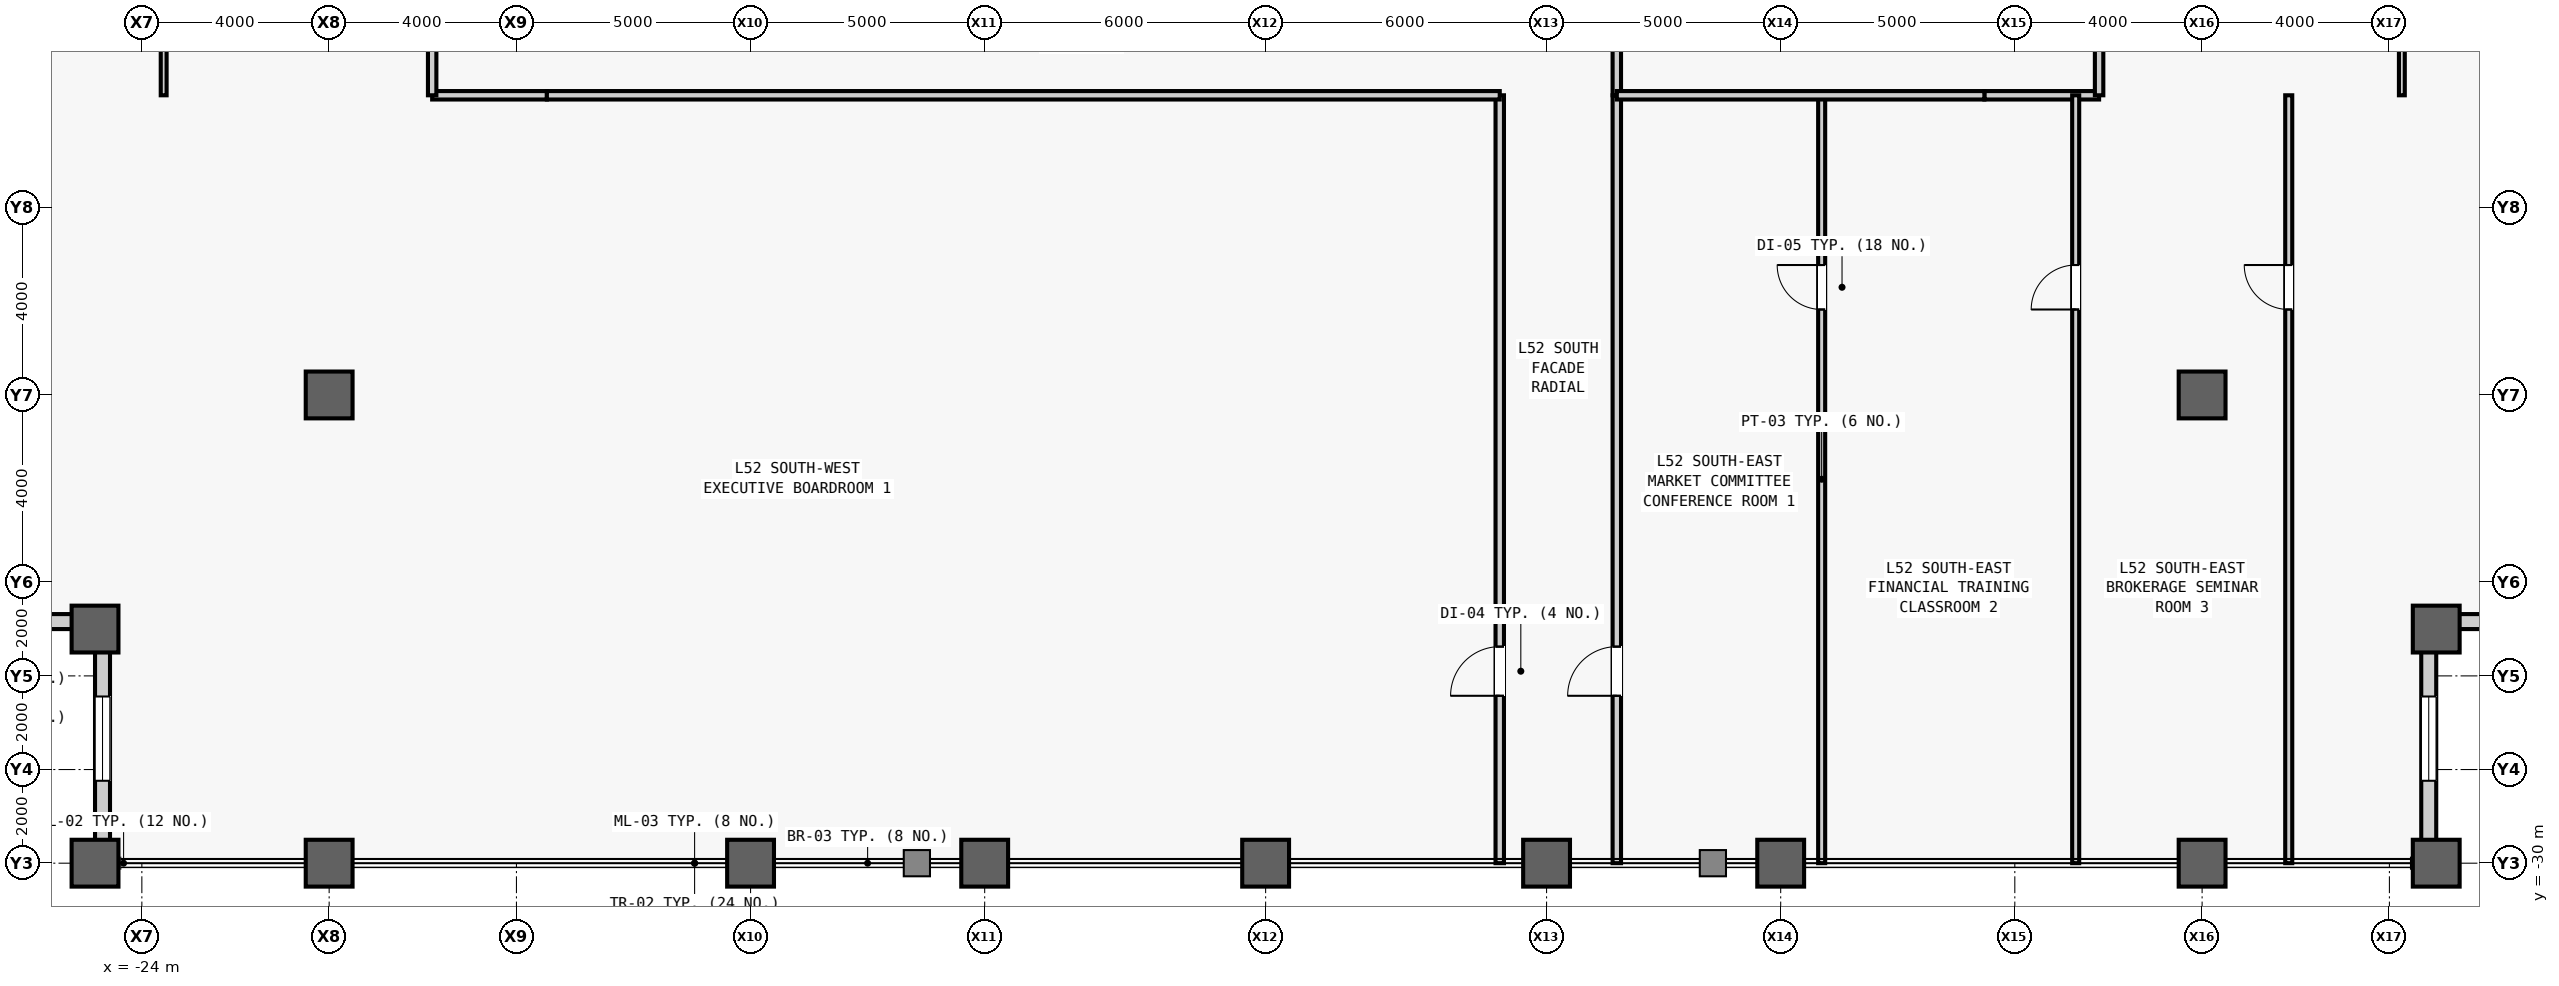
"""IFC4 building model, lengths in metres.
Left out: names, types, materials, properties, quantities, classifications, styles, units other than length and angle.
Written with IfcOpenShell. Run it as: python <this file> out.ifc"""

import sys

from ifc_helpers import new_model, si_unit, direction, frame, frame_2d, origin, origin_2d, place, context, subcontext, project, spatial, rectangle, hollow_rectangle, extrude, source, transform, mapped, element, fill, save


model = new_model("IFC4")
c1 = context("Model", 3, precision=1e-05, world=origin(), true_north=direction((0.0, 1.0)))
c2 = subcontext(c1, "Body", "Model", "MODEL_VIEW")
j1 = project(units=[si_unit("LENGTHUNIT", "METRE"), si_unit("PLANEANGLEUNIT", "RADIAN")], contexts=[c1])
p1 = place(None, origin())
s1 = spatial("IfcSite", under=j1, at=p1, CompositionType="ELEMENT")
p2 = place(p1, origin())
s2 = spatial("IfcBuilding", under=s1, at=p2, CompositionType="ELEMENT")
p3 = place(p2, frame((0.0, 0.0, 223.1)))
s3 = spatial("IfcBuildingStorey", under=s2, at=p3, CompositionType="ELEMENT", Elevation=223.1)
m1 = source(origin(), c2, "Body", "SweptSolid", [
    extrude(hollow_rectangle(XDim=1.0, YDim=1.0, WallThickness=0.055, at=origin_2d()), origin(), (0.0, 0.0, 1.0), 4.0),
])
for number, where, z_axis, x_axis in (
    (1, (-25.0, -30.0, 0.0), (0.0, 0.0, 1.0), (1.0, 0.0, 0.0)),
    (2, (-25.0, -25.0, 0.0), (0.0, 0.0, 1.0), (1.0, 0.0, 0.0)),
    (3, (-20.0, -30.0, 0.0), (0.0, 0.0, 1.0), (1.0, 0.0, 0.0)),
    (4, (-20.0, -20.0, 0.0), (0.0, 0.0, 1.0), (1.0, 0.0, 0.0)),
    (5, (-11.0, -30.0, 0.0), (0.0, 0.0, 1.0), (1.0, 0.0, 0.0)),
    (6, (-6.0, -30.0, 0.0), (0.0, 0.0, 1.0), (1.0, 0.0, 0.0)),
    (7, (0.0, -30.0, 0.0), (0.0, 0.0, 1.0), (1.0, 0.0, 0.0)),
    (8, (6.0, -30.0, 0.0), (0.0, 0.0, 1.0), (1.0, 0.0, 0.0)),
    (9, (11.0, -30.0, 0.0), (0.0, 0.0, 1.0), (1.0, 0.0, 0.0)),
    (10, (20.0, -30.0, 0.0), (0.0, 0.0, 1.0), (1.0, 0.0, 0.0)),
    (11, (20.0, -20.0, 0.0), (0.0, 0.0, 1.0), (1.0, 0.0, 0.0)),
    (12, (25.0, -30.0, 0.0), (0.0, 0.0, 1.0), (1.0, 0.0, 0.0)),
    (13, (25.0, -25.0, 0.0), (0.0, 0.0, 1.0), (1.0, 0.0, 0.0)),
):
    element("IfcColumn", number, at=place(p3, frame(where, z_axis=z_axis, x_axis=x_axis)), inside=s3, PredefinedType="COLUMN", context=c2, shape_type="MappedRepresentation", body=[
        mapped(m1, transform((0.0, 0.0, 0.0), scale=1.0)),
    ])
m2 = source(origin(), c2, "Body", "SweptSolid", [
    extrude(rectangle(XDim=4.68, YDim=0.32, at=frame_2d((2.34, 0.0))), origin(), (0.0, 0.0, 1.0), 3.164),
])
p4 = place(p3, frame((-25.0, -24.84, 0.0), z_axis=(0.0, 0.0, 1.0), x_axis=(-1.0, 0.0, 0.0)))
e14 = element("IfcWall", 14, at=p4, inside=s3, PredefinedType="STANDARD", context=c2, shape_type="MappedRepresentation", body=[
    mapped(m2, transform((0.0, 0.0, 0.0), scale=1.0)),
])
m3 = source(origin(), c2, "Body", "SweptSolid", [
    extrude(rectangle(XDim=1.8, YDim=2.4, at=frame_2d((0.9, 1.2))), frame((0.0, 0.17, 0.0), z_axis=(0.0, -1.0, 0.0), x_axis=(1.0, 0.0, 0.0)), (0.0, 0.0, 1.0), 0.34),
])
p5 = place(p4, frame((1.44, 0.0, 0.5)))
e15 = element("IfcOpeningElement", 15, at=p5, cuts=e14, PredefinedType="OPENING", context=c2, shape_type="MappedRepresentation", body=[
    mapped(m3, transform((0.0, 0.0, 0.0), scale=1.0)),
])
p6 = place(p3, frame((-24.84, -29.68, 0.0), z_axis=(0.0, 0.0, 1.0), x_axis=(0.0, 1.0, 0.0)))
e16 = element("IfcWall", 16, at=p6, inside=s3, PredefinedType="STANDARD", context=c2, shape_type="MappedRepresentation", body=[
    mapped(m2, transform((0.0, 0.0, 0.0), scale=1.0)),
])
p7 = place(p6, frame((1.44, 0.0, 0.5)))
e17 = element("IfcOpeningElement", 17, at=p7, cuts=e16, PredefinedType="OPENING", context=c2, shape_type="MappedRepresentation", body=[
    mapped(m3, transform((0.0, 0.0, 0.0), scale=1.0)),
])
p8 = place(p3, frame((24.84, -29.68, 0.0), z_axis=(0.0, 0.0, 1.0), x_axis=(0.0, 1.0, 0.0)))
e18 = element("IfcWall", 18, at=p8, inside=s3, PredefinedType="STANDARD", context=c2, shape_type="MappedRepresentation", body=[
    mapped(m2, transform((0.0, 0.0, 0.0), scale=1.0)),
])
p9 = place(p8, frame((1.44, 0.0, 0.5)))
e19 = element("IfcOpeningElement", 19, at=p9, cuts=e18, PredefinedType="OPENING", context=c2, shape_type="MappedRepresentation", body=[
    mapped(m3, transform((0.0, 0.0, 0.0), scale=1.0)),
])
p10 = place(p3, frame((25.0, -24.84, 0.0), z_axis=(0.0, 0.0, 1.0), x_axis=(1.0, 0.0, 0.0)))
e20 = element("IfcWall", 20, at=p10, inside=s3, PredefinedType="STANDARD", context=c2, shape_type="MappedRepresentation", body=[
    mapped(m2, transform((0.0, 0.0, 0.0), scale=1.0)),
])
p11 = place(p10, frame((1.44, 0.0, 0.5)))
e21 = element("IfcOpeningElement", 21, at=p11, cuts=e20, PredefinedType="OPENING", context=c2, shape_type="MappedRepresentation", body=[
    mapped(m3, transform((0.0, 0.0, 0.0), scale=1.0)),
])
m4 = source(origin(), c2, "Body", "SweptSolid", [
    extrude(rectangle(XDim=2.45, YDim=0.18, at=frame_2d((1.225, 0.0))), origin(), (0.0, 0.0, 1.0), 3.78),
])
for number, where, z_axis, x_axis in (
    (22, (15.35, -13.6, 0.0), (0.0, 0.0, 1.0), (1.0, 0.0, 0.0)),
    (23, (-17.8, -13.6, 0.0), (0.0, 0.0, 1.0), (1.0, 0.0, 0.0)),
):
    element("IfcWall", number, at=place(p3, frame(where, z_axis=z_axis, x_axis=x_axis)), inside=s3, PredefinedType="PARTITIONING", context=c2, shape_type="MappedRepresentation", body=[
        mapped(m4, transform((0.0, 0.0, 0.0), scale=1.0)),
    ])
m5 = source(origin(), c2, "Body", "SweptSolid", [
    extrude(rectangle(XDim=2.6, YDim=0.18, at=frame_2d((1.3, 0.0))), origin(), (0.0, 0.0, 1.0), 3.78),
])
p12 = place(p3, frame((7.5, -13.6, 0.0), z_axis=(0.0, 0.0, 1.0), x_axis=(0.0, 1.0, 0.0)))
e24 = element("IfcWall", 24, at=p12, inside=s3, PredefinedType="PARTITIONING", context=c2, shape_type="MappedRepresentation", body=[
    mapped(m5, transform((0.0, 0.0, 0.0), scale=1.0)),
])
m6 = source(origin(), c2, "Body", "SweptSolid", [
    extrude(rectangle(XDim=16.4, YDim=0.18, at=frame_2d((8.2, 0.0))), origin(), (0.0, 0.0, 1.0), 3.78),
])
p13 = place(p3, frame((5.0, -30.0, 0.0), z_axis=(0.0, 0.0, 1.0), x_axis=(0.0, 1.0, 0.0)))
e25 = element("IfcWall", 25, at=p13, inside=s3, PredefinedType="PARTITIONING", context=c2, shape_type="MappedRepresentation", body=[
    mapped(m6, transform((0.0, 0.0, 0.0), scale=1.0)),
])
m7 = source(origin(), c2, "Body", "SweptSolid", [
    extrude(rectangle(XDim=1.05, YDim=2.2, at=frame_2d((0.525, 1.1))), frame((0.0, 0.1, 0.0), z_axis=(0.0, -1.0, 0.0), x_axis=(1.0, 0.0, 0.0)), (0.0, 0.0, 1.0), 0.2),
])
p14 = place(p13, frame((3.575, 0.0, 0.0)))
e26 = element("IfcOpeningElement", 26, at=p14, cuts=e25, PredefinedType="OPENING", context=c2, shape_type="MappedRepresentation", body=[
    mapped(m7, transform((0.0, 0.0, 0.0), scale=1.0)),
])
m8 = source(origin(), c2, "Body", "SweptSolid", [
    extrude(rectangle(XDim=20.35, YDim=0.18, at=frame_2d((10.175, 0.0))), origin(), (0.0, 0.0, 1.0), 3.78),
])
p15 = place(p3, frame((-15.35, -13.6, 0.0), z_axis=(0.0, 0.0, 1.0), x_axis=(1.0, 0.0, 0.0)))
e27 = element("IfcWall", 27, at=p15, inside=s3, PredefinedType="PARTITIONING", context=c2, shape_type="MappedRepresentation", body=[
    mapped(m8, transform((0.0, 0.0, 0.0), scale=1.0)),
])
m9 = source(origin(), c2, "Body", "SweptSolid", [
    extrude(rectangle(XDim=16.4, YDim=0.15, at=frame_2d((8.2, 0.0))), origin(), (0.0, 0.0, 1.0), 3.78),
])
p16 = place(p3, frame((11.875, -30.0, 0.0), z_axis=(0.0, 0.0, 1.0), x_axis=(0.0, 1.0, 0.0)))
e28 = element("IfcWall", 28, at=p16, inside=s3, PredefinedType="PARTITIONING", context=c2, shape_type="MappedRepresentation", body=[
    mapped(m9, transform((0.0, 0.0, 0.0), scale=1.0)),
])
m10 = source(origin(), c2, "Body", "SweptSolid", [
    extrude(rectangle(XDim=0.95, YDim=2.15, at=frame_2d((0.475, 1.075))), frame((0.0, 0.085, 0.0), z_axis=(0.0, -1.0, 0.0), x_axis=(1.0, 0.0, 0.0)), (0.0, 0.0, 1.0), 0.17),
])
p17 = place(p16, frame((11.825, 0.0, 0.0)))
e29 = element("IfcOpeningElement", 29, at=p17, cuts=e28, PredefinedType="OPENING", context=c2, shape_type="MappedRepresentation", body=[
    mapped(m10, transform((0.0, 0.0, 0.0), scale=1.0)),
])
p18 = place(p3, frame((17.3, -30.0, 0.0), z_axis=(0.0, 0.0, 1.0), x_axis=(0.0, 1.0, 0.0)))
e30 = element("IfcWall", 30, at=p18, inside=s3, PredefinedType="PARTITIONING", context=c2, shape_type="MappedRepresentation", body=[
    mapped(m9, transform((0.0, 0.0, 0.0), scale=1.0)),
])
p19 = place(p18, frame((11.825, 0.0, 0.0)))
e31 = element("IfcOpeningElement", 31, at=p19, cuts=e30, PredefinedType="OPENING", context=c2, shape_type="MappedRepresentation", body=[
    mapped(m10, transform((0.0, 0.0, 0.0), scale=1.0)),
])
p20 = place(p3, frame((21.85, -30.0, 0.0), z_axis=(0.0, 0.0, 1.0), x_axis=(0.0, 1.0, 0.0)))
e32 = element("IfcWall", 32, at=p20, inside=s3, PredefinedType="PARTITIONING", context=c2, shape_type="MappedRepresentation", body=[
    mapped(m9, transform((0.0, 0.0, 0.0), scale=1.0)),
])
p21 = place(p20, frame((11.825, 0.0, 0.0)))
e33 = element("IfcOpeningElement", 33, at=p21, cuts=e32, PredefinedType="OPENING", context=c2, shape_type="MappedRepresentation", body=[
    mapped(m10, transform((0.0, 0.0, 0.0), scale=1.0)),
])
p22 = place(p3, frame((7.5, -30.0, 0.0), z_axis=(0.0, 0.0, 1.0), x_axis=(0.0, 1.0, 0.0)))
e34 = element("IfcWall", 34, at=p22, inside=s3, PredefinedType="PARTITIONING", context=c2, shape_type="MappedRepresentation", body=[
    mapped(m6, transform((0.0, 0.0, 0.0), scale=1.0)),
])
p23 = place(p22, frame((3.575, 0.0, 0.0)))
e35 = element("IfcOpeningElement", 35, at=p23, cuts=e34, PredefinedType="OPENING", context=c2, shape_type="MappedRepresentation", body=[
    mapped(m7, transform((0.0, 0.0, 0.0), scale=1.0)),
])
m11 = source(origin(), c2, "Body", "SweptSolid", [
    extrude(rectangle(XDim=7.85, YDim=0.18, at=frame_2d((3.925, 0.0))), origin(), (0.0, 0.0, 1.0), 3.78),
])
p24 = place(p3, frame((7.5, -13.6, 0.0), z_axis=(0.0, 0.0, 1.0), x_axis=(1.0, 0.0, 0.0)))
e36 = element("IfcWall", 36, at=p24, inside=s3, PredefinedType="PARTITIONING", context=c2, shape_type="MappedRepresentation", body=[
    mapped(m11, transform((0.0, 0.0, 0.0), scale=1.0)),
])
m12 = source(origin(), c2, "Body", "SweptSolid", [
    extrude(rectangle(XDim=13.7, YDim=0.125, at=frame_2d((6.85, 0.0))), origin(), (0.0, 0.0, 1.0), 3.78),
])
p25 = place(p3, frame((-23.534, -13.6, 0.0), z_axis=(0.0, 0.0, 1.0), x_axis=(0.0, 1.0, 0.0)))
e37 = element("IfcWall", 37, at=p25, inside=s3, PredefinedType="PARTITIONING", context=c2, shape_type="MappedRepresentation", body=[
    mapped(m12, transform((0.0, 0.0, 0.0), scale=1.0)),
])
m13 = source(origin(), c2, "Body", "SweptSolid", [
    extrude(rectangle(XDim=13.7, YDim=0.18, at=frame_2d((6.85, 0.0))), origin(), (0.0, 0.0, 1.0), 3.78),
])
p26 = place(p3, frame((-17.8, -13.6, 0.0), z_axis=(0.0, 0.0, 1.0), x_axis=(0.0, 1.0, 0.0)))
e38 = element("IfcWall", 38, at=p26, inside=s3, PredefinedType="PARTITIONING", context=c2, shape_type="MappedRepresentation", body=[
    mapped(m13, transform((0.0, 0.0, 0.0), scale=1.0)),
])
m14 = source(origin(), c2, "Body", "SweptSolid", [
    extrude(rectangle(XDim=13.1, YDim=0.125, at=frame_2d((6.55, 0.0))), origin(), (0.0, 0.0, 1.0), 3.78),
])
p27 = place(p3, frame((24.266, -13.6, 0.0), z_axis=(0.0, 0.0, 1.0), x_axis=(0.0, 1.0, 0.0)))
e39 = element("IfcWall", 39, at=p27, inside=s3, PredefinedType="PARTITIONING", context=c2, shape_type="MappedRepresentation", body=[
    mapped(m14, transform((0.0, 0.0, 0.0), scale=1.0)),
])
m15 = source(origin(), c2, "Body", "SweptSolid", [
    extrude(rectangle(XDim=13.1, YDim=0.18, at=frame_2d((6.55, 0.0))), origin(), (0.0, 0.0, 1.0), 3.78),
])
p28 = place(p3, frame((17.8, -13.6, 0.0), z_axis=(0.0, 0.0, 1.0), x_axis=(0.0, 1.0, 0.0)))
e40 = element("IfcWall", 40, at=p28, inside=s3, PredefinedType="PARTITIONING", context=c2, shape_type="MappedRepresentation", body=[
    mapped(m15, transform((0.0, 0.0, 0.0), scale=1.0)),
])
m16 = source(origin(), c2, "Body", "SweptSolid", [
    extrude(rectangle(XDim=1.8, YDim=2.4, at=frame_2d((0.9, 1.2))), frame((0.0, 0.03, 0.0), z_axis=(0.0, -1.0, 0.0), x_axis=(1.0, 0.0, 0.0)), (0.0, 0.0, 1.0), 0.06),
])
p29 = place(p7, origin())
e41 = element("IfcWindow", 41, at=p29, inside=s3, PartitioningType="SINGLE_PANEL", PredefinedType="WINDOW", context=c2, shape_type="MappedRepresentation", body=[
    mapped(m16, transform((0.0, 0.0, 0.0), scale=1.0)),
])
fill(e17, e41)
p30 = place(p9, origin())
e42 = element("IfcWindow", 42, at=p30, inside=s3, PartitioningType="SINGLE_PANEL", PredefinedType="WINDOW", context=c2, shape_type="MappedRepresentation", body=[
    mapped(m16, transform((0.0, 0.0, 0.0), scale=1.0)),
])
fill(e19, e42)
m17 = source(origin(), c2, "Body", "SweptSolid", [
    extrude(rectangle(XDim=1.05, YDim=2.2, at=frame_2d((0.525, 1.1))), frame((0.0, 0.025, 0.0), z_axis=(0.0, -1.0, 0.0), x_axis=(1.0, 0.0, 0.0)), (0.0, 0.0, 1.0), 0.05),
])
p31 = place(p14, origin())
e43 = element("IfcDoor", 43, at=p31, inside=s3, OperationType="SINGLE_SWING_LEFT", PredefinedType="DOOR", context=c2, shape_type="MappedRepresentation", body=[
    mapped(m17, transform((0.0, 0.0, 0.0), scale=1.0)),
])
fill(e26, e43)
m18 = source(origin(), c2, "Body", "SweptSolid", [
    extrude(rectangle(XDim=0.95, YDim=2.15, at=frame_2d((0.475, 1.075))), frame((0.0, 0.025, 0.0), z_axis=(0.0, -1.0, 0.0), x_axis=(1.0, 0.0, 0.0)), (0.0, 0.0, 1.0), 0.05),
])
p32 = place(p17, origin())
e44 = element("IfcDoor", 44, at=p32, inside=s3, OperationType="SINGLE_SWING_RIGHT", PredefinedType="DOOR", context=c2, shape_type="MappedRepresentation", body=[
    mapped(m18, transform((0.0, 0.0, 0.0), scale=1.0)),
])
fill(e29, e44)
p33 = place(p19, origin())
e45 = element("IfcDoor", 45, at=p33, inside=s3, OperationType="SINGLE_SWING_LEFT", PredefinedType="DOOR", context=c2, shape_type="MappedRepresentation", body=[
    mapped(m18, transform((0.0, 0.0, 0.0), scale=1.0)),
])
fill(e31, e45)
p34 = place(p21, origin())
e46 = element("IfcDoor", 46, at=p34, inside=s3, OperationType="SINGLE_SWING_RIGHT", PredefinedType="DOOR", context=c2, shape_type="MappedRepresentation", body=[
    mapped(m18, transform((0.0, 0.0, 0.0), scale=1.0)),
])
fill(e33, e46)
p35 = place(p23, origin())
e47 = element("IfcDoor", 47, at=p35, inside=s3, OperationType="SINGLE_SWING_LEFT", PredefinedType="DOOR", context=c2, shape_type="MappedRepresentation", body=[
    mapped(m17, transform((0.0, 0.0, 0.0), scale=1.0)),
])
fill(e35, e47)
save(model, sys.argv[1])
